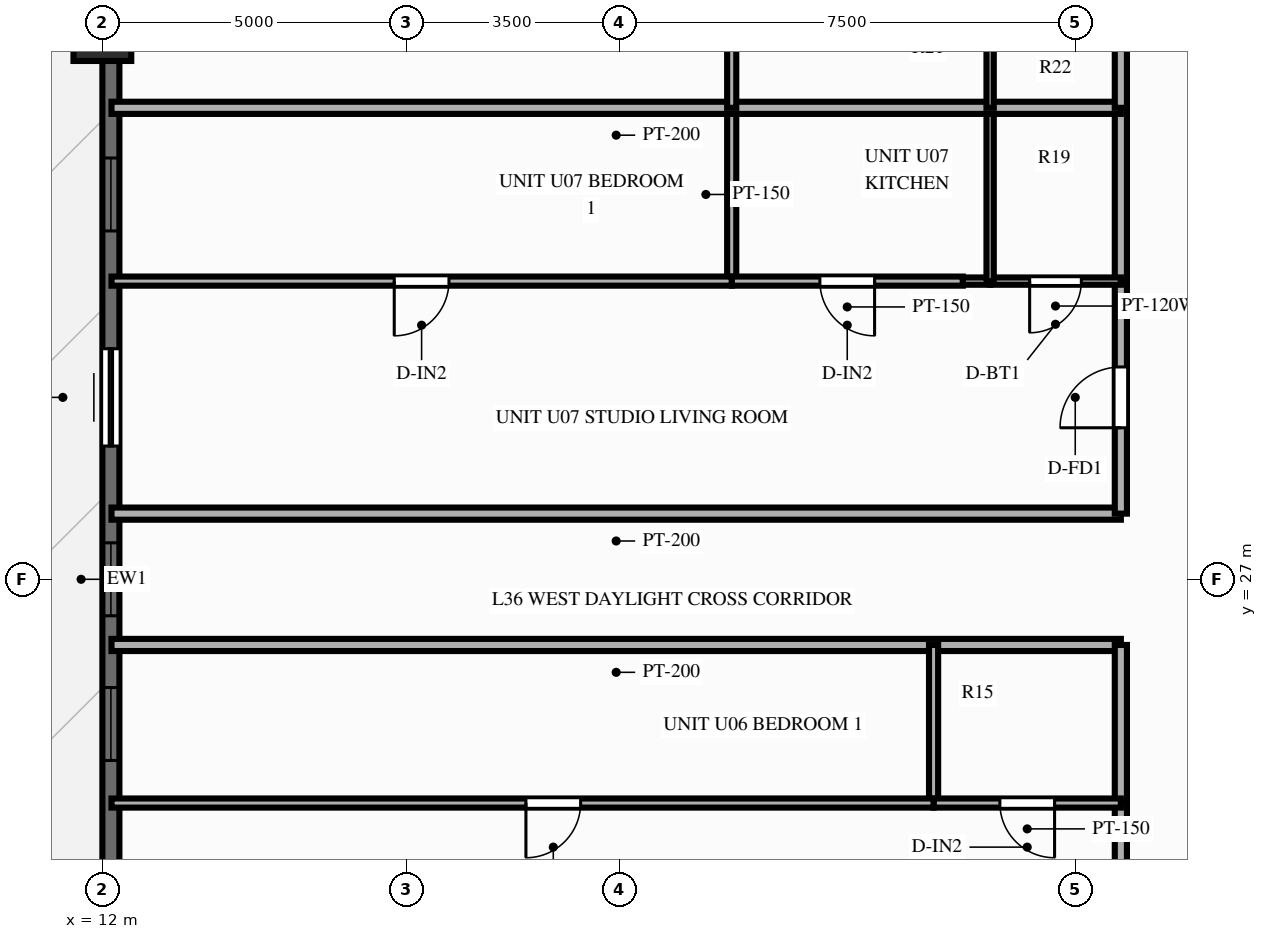
"""IFC4 building model, lengths in metres.
Left out: names, types, materials, properties, quantities, classifications, styles, units other than length and angle.
Written with IfcOpenShell. Run it as: python <this file> out.ifc"""

import sys

from ifc_helpers import new_model, si_unit, direction, frame, frame_2d, origin, origin_2d, place, context, subcontext, project, spatial, rectangle, extrude, source, transform, mapped, element, fill, save


model = new_model("IFC4")
c1 = context("Model", 3, precision=1e-05, world=origin(), true_north=direction((0.0, 1.0)))
c2 = subcontext(c1, "Body", "Model", "MODEL_VIEW")
j1 = project(units=[si_unit("LENGTHUNIT", "METRE"), si_unit("PLANEANGLEUNIT", "RADIAN")], contexts=[c1])
p1 = place(None, origin())
s1 = spatial("IfcSite", under=j1, at=p1, CompositionType="ELEMENT")
p2 = place(p1, origin())
s2 = spatial("IfcBuilding", under=s1, at=p2, CompositionType="ELEMENT")
p3 = place(p2, frame((0.0, 0.0, 113.85)))
s3 = spatial("IfcBuildingStorey", under=s2, at=p3, CompositionType="ELEMENT", Elevation=113.85)
m1 = source(origin(), c2, "Body", "SweptSolid", [
    extrude(rectangle(XDim=0.95, YDim=0.95, at=origin_2d()), origin(), (0.0, 0.0, 1.0), 3.0),
])
p4 = place(p3, frame((12.0, 36.0, 0.0), z_axis=(0.0, 0.0, 1.0), x_axis=(1.0, 0.0, 0.0)))
e1 = element("IfcColumn", 1, at=p4, inside=s3, PredefinedType="COLUMN", context=c2, shape_type="MappedRepresentation", body=[
    mapped(m1, transform((0.0, 0.0, 0.0), scale=1.0)),
])
p5 = place(p3, frame((12.14, 7.2, 0.0), z_axis=(0.0, 0.0, 1.0), x_axis=(0.0, 1.0, 0.0)))
e2 = element("IfcWall", 2, at=p5, inside=s3, PredefinedType="SOLIDWALL", context=c2, shape_type="SweptSolid", body=[
    extrude(rectangle(XDim=39.6, YDim=0.28, at=frame_2d((19.8, 0.0))), origin(), (0.0, 0.0, 1.0), 2.28),
])
p6 = place(p5, frame((0.945, 0.0, 0.25)))
e3 = element("IfcOpeningElement", 3, at=p6, cuts=e2, PredefinedType="OPENING", context=c2, shape_type="SweptSolid", body=[
    extrude(rectangle(XDim=1.2, YDim=1.5, at=frame_2d((0.6, 0.75))), frame((0.0, 0.152, 0.0), z_axis=(0.0, -1.0, 0.0), x_axis=(1.0, 0.0, 0.0)), (0.0, 0.0, 1.0), 0.304),
])
p7 = place(p5, frame((4.213, 0.0, 0.25)))
e4 = element("IfcOpeningElement", 4, at=p7, cuts=e2, PredefinedType="OPENING", context=c2, shape_type="SweptSolid", body=[
    extrude(rectangle(XDim=1.2, YDim=1.5, at=frame_2d((0.6, 0.75))), frame((0.0, 0.152, 0.0), z_axis=(0.0, -1.0, 0.0), x_axis=(1.0, 0.0, 0.0)), (0.0, 0.0, 1.0), 0.304),
])
p8 = place(p5, frame((7.55, 0.0, 0.25)))
e5 = element("IfcOpeningElement", 5, at=p8, cuts=e2, PredefinedType="OPENING", context=c2, shape_type="SweptSolid", body=[
    extrude(rectangle(XDim=1.2, YDim=1.5, at=frame_2d((0.6, 0.75))), frame((0.0, 0.152, 0.0), z_axis=(0.0, -1.0, 0.0), x_axis=(1.0, 0.0, 0.0)), (0.0, 0.0, 1.0), 0.304),
])
p9 = place(p5, frame((13.483, 0.0, 0.25)))
e6 = element("IfcOpeningElement", 6, at=p9, cuts=e2, PredefinedType="OPENING", context=c2, shape_type="SweptSolid", body=[
    extrude(rectangle(XDim=1.2, YDim=1.5, at=frame_2d((0.6, 0.75))), frame((0.0, 0.152, 0.0), z_axis=(0.0, -1.0, 0.0), x_axis=(1.0, 0.0, 0.0)), (0.0, 0.0, 1.0), 0.304),
])
p10 = place(p5, frame((16.82, 0.0, 0.25)))
e7 = element("IfcOpeningElement", 7, at=p10, cuts=e2, PredefinedType="OPENING", context=c2, shape_type="SweptSolid", body=[
    extrude(rectangle(XDim=1.2, YDim=1.5, at=frame_2d((0.6, 0.75))), frame((0.0, 0.152, 0.0), z_axis=(0.0, -1.0, 0.0), x_axis=(1.0, 0.0, 0.0)), (0.0, 0.0, 1.0), 0.304),
])
p11 = place(p5, frame((19.2, 0.0, 0.25)))
e8 = element("IfcOpeningElement", 8, at=p11, cuts=e2, PredefinedType="OPENING", context=c2, shape_type="SweptSolid", body=[
    extrude(rectangle(XDim=1.2, YDim=1.5, at=frame_2d((0.6, 0.75))), frame((0.0, 0.152, 0.0), z_axis=(0.0, -1.0, 0.0), x_axis=(1.0, 0.0, 0.0)), (0.0, 0.0, 1.0), 0.304),
])
p12 = place(p5, frame((21.992, 0.0, 0.0)))
e9 = element("IfcOpeningElement", 9, at=p12, cuts=e2, PredefinedType="OPENING", context=c2, shape_type="SweptSolid", body=[
    extrude(rectangle(XDim=1.6, YDim=2.15, at=frame_2d((0.8, 1.075))), frame((0.0, 0.152, 0.0), z_axis=(0.0, -1.0, 0.0), x_axis=(1.0, 0.0, 0.0)), (0.0, 0.0, 1.0), 0.304),
])
p13 = place(p5, frame((25.529, 0.0, 0.25)))
e10 = element("IfcOpeningElement", 10, at=p13, cuts=e2, PredefinedType="OPENING", context=c2, shape_type="SweptSolid", body=[
    extrude(rectangle(XDim=1.2, YDim=1.5, at=frame_2d((0.6, 0.75))), frame((0.0, 0.152, 0.0), z_axis=(0.0, -1.0, 0.0), x_axis=(1.0, 0.0, 0.0)), (0.0, 0.0, 1.0), 0.304),
])
p14 = place(p5, frame((29.349, 0.0, 0.25)))
e11 = element("IfcOpeningElement", 11, at=p14, cuts=e2, PredefinedType="OPENING", context=c2, shape_type="SweptSolid", body=[
    extrude(rectangle(XDim=0.7, YDim=1.5, at=frame_2d((0.35, 0.75))), frame((0.0, 0.152, 0.0), z_axis=(0.0, -1.0, 0.0), x_axis=(1.0, 0.0, 0.0)), (0.0, 0.0, 1.0), 0.304),
])
p15 = place(p5, frame((31.285, 0.0, 0.25)))
e12 = element("IfcOpeningElement", 12, at=p15, cuts=e2, PredefinedType="OPENING", context=c2, shape_type="SweptSolid", body=[
    extrude(rectangle(XDim=1.2, YDim=1.5, at=frame_2d((0.6, 0.75))), frame((0.0, 0.152, 0.0), z_axis=(0.0, -1.0, 0.0), x_axis=(1.0, 0.0, 0.0)), (0.0, 0.0, 1.0), 0.304),
])
p16 = place(p5, frame((34.252, 0.0, 0.25)))
e13 = element("IfcOpeningElement", 13, at=p16, cuts=e2, PredefinedType="OPENING", context=c2, shape_type="SweptSolid", body=[
    extrude(rectangle(XDim=1.2, YDim=1.5, at=frame_2d((0.6, 0.75))), frame((0.0, 0.152, 0.0), z_axis=(0.0, -1.0, 0.0), x_axis=(1.0, 0.0, 0.0)), (0.0, 0.0, 1.0), 0.304),
])
p17 = place(p5, frame((37.151, 0.0, 0.25)))
e14 = element("IfcOpeningElement", 14, at=p17, cuts=e2, PredefinedType="OPENING", context=c2, shape_type="SweptSolid", body=[
    extrude(rectangle(XDim=1.2, YDim=1.5, at=frame_2d((0.6, 0.75))), frame((0.0, 0.152, 0.0), z_axis=(0.0, -1.0, 0.0), x_axis=(1.0, 0.0, 0.0)), (0.0, 0.0, 1.0), 0.304),
])
p18 = place(p3, frame((28.75, 25.92, 0.0), z_axis=(0.0, 0.0, 1.0), x_axis=(-1.0, 0.0, 0.0)))
e15 = element("IfcWall", 15, at=p18, inside=s3, PredefinedType="PARTITIONING", context=c2, shape_type="SweptSolid", body=[
    extrude(rectangle(XDim=16.6, YDim=0.2, at=frame_2d((8.3, 0.0))), origin(), (0.0, 0.0, 1.0), 2.79),
])
p19 = place(p3, frame((28.75, 19.246, 0.0), z_axis=(0.0, 0.0, 1.0), x_axis=(0.0, 1.0, 0.0)))
e16 = element("IfcWall", 16, at=p19, inside=s3, PredefinedType="PARTITIONING", context=c2, shape_type="SweptSolid", body=[
    extrude(rectangle(XDim=4.074, YDim=0.2, at=frame_2d((2.037, 0.0))), origin(), (0.0, 0.0, 1.0), 2.79),
])
p20 = place(p19, frame((1.537, 0.0, 0.0)))
e17 = element("IfcOpeningElement", 17, at=p20, cuts=e16, PredefinedType="OPENING", context=c2, shape_type="SweptSolid", body=[
    extrude(rectangle(XDim=1.0, YDim=2.15, at=frame_2d((0.5, 1.075))), frame((0.0, 0.112, 0.0), z_axis=(0.0, -1.0, 0.0), x_axis=(1.0, 0.0, 0.0)), (0.0, 0.0, 1.0), 0.224),
])
p21 = place(p3, frame((28.75, 23.32, 0.0), z_axis=(0.0, 0.0, 1.0), x_axis=(0.0, 1.0, 0.0)))
e18 = element("IfcWall", 18, at=p21, inside=s3, PredefinedType="PARTITIONING", context=c2, shape_type="SweptSolid", body=[
    extrude(rectangle(XDim=2.6, YDim=0.2, at=frame_2d((1.3, 0.0))), origin(), (0.0, 0.0, 1.0), 2.79),
])
p22 = place(p3, frame((25.67, 23.32, 0.0), z_axis=(0.0, 0.0, 1.0), x_axis=(0.0, 1.0, 0.0)))
e19 = element("IfcWall", 19, at=p22, inside=s3, PredefinedType="PARTITIONING", context=c2, shape_type="SweptSolid", body=[
    extrude(rectangle(XDim=2.6, YDim=0.15, at=frame_2d((1.3, 0.0))), origin(), (0.0, 0.0, 1.0), 2.79),
])
p23 = place(p3, frame((28.75, 23.32, 0.0), z_axis=(0.0, 0.0, 1.0), x_axis=(-1.0, 0.0, 0.0)))
e20 = element("IfcWall", 20, at=p23, inside=s3, PredefinedType="PARTITIONING", context=c2, shape_type="SweptSolid", body=[
    extrude(rectangle(XDim=3.08, YDim=0.15, at=frame_2d((1.54, 0.0))), origin(), (0.0, 0.0, 1.0), 2.79),
])
p24 = place(p23, frame((1.09, 0.0, 0.0)))
e21 = element("IfcOpeningElement", 21, at=p24, cuts=e20, PredefinedType="OPENING", context=c2, shape_type="SweptSolid", body=[
    extrude(rectangle(XDim=0.9, YDim=2.1, at=frame_2d((0.45, 1.05))), frame((0.0, 0.087, 0.0), z_axis=(0.0, -1.0, 0.0), x_axis=(1.0, 0.0, 0.0)), (0.0, 0.0, 1.0), 0.174),
])
p25 = place(p3, frame((25.67, 23.32, 0.0), z_axis=(0.0, 0.0, 1.0), x_axis=(-1.0, 0.0, 0.0)))
e22 = element("IfcWall", 22, at=p25, inside=s3, PredefinedType="PARTITIONING", context=c2, shape_type="SweptSolid", body=[
    extrude(rectangle(XDim=13.52, YDim=0.15, at=frame_2d((6.76, 0.0))), origin(), (0.0, 0.0, 1.0), 2.79),
])
p26 = place(p25, frame((5.804, 0.0, 0.0)))
e23 = element("IfcOpeningElement", 23, at=p26, cuts=e22, PredefinedType="OPENING", context=c2, shape_type="SweptSolid", body=[
    extrude(rectangle(XDim=0.9, YDim=2.1, at=frame_2d((0.45, 1.05))), frame((0.0, 0.087, 0.0), z_axis=(0.0, -1.0, 0.0), x_axis=(1.0, 0.0, 0.0)), (0.0, 0.0, 1.0), 0.174),
])
p27 = place(p3, frame((28.75, 28.08, 0.0), z_axis=(0.0, 0.0, 1.0), x_axis=(-1.0, 0.0, 0.0)))
e24 = element("IfcWall", 24, at=p27, inside=s3, PredefinedType="PARTITIONING", context=c2, shape_type="SweptSolid", body=[
    extrude(rectangle(XDim=16.6, YDim=0.2, at=frame_2d((8.3, 0.0))), origin(), (0.0, 0.0, 1.0), 2.79),
])
p28 = place(p3, frame((28.75, 28.08, 0.0), z_axis=(0.0, 0.0, 1.0), x_axis=(0.0, 1.0, 0.0)))
e25 = element("IfcWall", 25, at=p28, inside=s3, PredefinedType="PARTITIONING", context=c2, shape_type="SweptSolid", body=[
    extrude(rectangle(XDim=3.824, YDim=0.2, at=frame_2d((1.912, 0.0))), origin(), (0.0, 0.0, 1.0), 2.79),
])
p29 = place(p28, frame((1.412, 0.0, 0.0)))
e26 = element("IfcOpeningElement", 26, at=p29, cuts=e25, PredefinedType="OPENING", context=c2, shape_type="SweptSolid", body=[
    extrude(rectangle(XDim=1.0, YDim=2.15, at=frame_2d((0.5, 1.075))), frame((0.0, 0.112, 0.0), z_axis=(0.0, -1.0, 0.0), x_axis=(1.0, 0.0, 0.0)), (0.0, 0.0, 1.0), 0.224),
])
p30 = place(p3, frame((28.75, 31.904, 0.0), z_axis=(0.0, 0.0, 1.0), x_axis=(0.0, 1.0, 0.0)))
e27 = element("IfcWall", 27, at=p30, inside=s3, PredefinedType="PARTITIONING", context=c2, shape_type="SweptSolid", body=[
    extrude(rectangle(XDim=2.85, YDim=0.2, at=frame_2d((1.425, 0.0))), origin(), (0.0, 0.0, 1.0), 2.79),
])
p31 = place(p3, frame((28.75, 31.904, 0.0), z_axis=(0.0, 0.0, 1.0), x_axis=(-1.0, 0.0, 0.0)))
e28 = element("IfcWall", 28, at=p31, inside=s3, PredefinedType="PARTITIONING", context=c2, shape_type="SweptSolid", body=[
    extrude(rectangle(XDim=2.15, YDim=0.12, at=frame_2d((1.075, 0.0))), origin(), (0.0, 0.0, 1.0), 2.79),
])
p32 = place(p31, frame((0.65, 0.0, 0.0)))
e29 = element("IfcOpeningElement", 29, at=p32, cuts=e28, PredefinedType="OPENING", context=c2, shape_type="SweptSolid", body=[
    extrude(rectangle(XDim=0.85, YDim=2.05, at=frame_2d((0.425, 1.025))), frame((0.0, 0.072, 0.0), z_axis=(0.0, -1.0, 0.0), x_axis=(1.0, 0.0, 0.0)), (0.0, 0.0, 1.0), 0.144),
])
p33 = place(p3, frame((26.6, 31.904, 0.0), z_axis=(0.0, 0.0, 1.0), x_axis=(-1.0, 0.0, 0.0)))
e30 = element("IfcWall", 30, at=p33, inside=s3, PredefinedType="PARTITIONING", context=c2, shape_type="SweptSolid", body=[
    extrude(rectangle(XDim=0.45, YDim=0.12, at=frame_2d((0.225, 0.0))), origin(), (0.0, 0.0, 1.0), 2.79),
])
p34 = place(p3, frame((26.6, 31.904, 0.0), z_axis=(0.0, 0.0, 1.0), x_axis=(0.0, 1.0, 0.0)))
e31 = element("IfcWall", 31, at=p34, inside=s3, PredefinedType="PARTITIONING", context=c2, shape_type="SweptSolid", body=[
    extrude(rectangle(XDim=2.85, YDim=0.12, at=frame_2d((1.425, 0.0))), origin(), (0.0, 0.0, 1.0), 2.79),
])
p35 = place(p3, frame((22.35, 31.904, 0.0), z_axis=(0.0, 0.0, 1.0), x_axis=(0.0, 1.0, 0.0)))
e32 = element("IfcWall", 32, at=p35, inside=s3, PredefinedType="PARTITIONING", context=c2, shape_type="SweptSolid", body=[
    extrude(rectangle(XDim=2.85, YDim=0.15, at=frame_2d((1.425, 0.0))), origin(), (0.0, 0.0, 1.0), 2.79),
])
p36 = place(p3, frame((26.15, 31.904, 0.0), z_axis=(0.0, 0.0, 1.0), x_axis=(-1.0, 0.0, 0.0)))
e33 = element("IfcWall", 33, at=p36, inside=s3, PredefinedType="PARTITIONING", context=c2, shape_type="SweptSolid", body=[
    extrude(rectangle(XDim=3.8, YDim=0.15, at=frame_2d((1.9, 0.0))), origin(), (0.0, 0.0, 1.0), 2.79),
])
p37 = place(p36, frame((1.45, 0.0, 0.0)))
e34 = element("IfcOpeningElement", 34, at=p37, cuts=e33, PredefinedType="OPENING", context=c2, shape_type="SweptSolid", body=[
    extrude(rectangle(XDim=0.9, YDim=2.1, at=frame_2d((0.45, 1.05))), frame((0.0, 0.087, 0.0), z_axis=(0.0, -1.0, 0.0), x_axis=(1.0, 0.0, 0.0)), (0.0, 0.0, 1.0), 0.174),
])
p38 = place(p3, frame((22.35, 31.904, 0.0), z_axis=(0.0, 0.0, 1.0), x_axis=(-1.0, 0.0, 0.0)))
e35 = element("IfcWall", 35, at=p38, inside=s3, PredefinedType="PARTITIONING", context=c2, shape_type="SweptSolid", body=[
    extrude(rectangle(XDim=10.2, YDim=0.15, at=frame_2d((5.1, 0.0))), origin(), (0.0, 0.0, 1.0), 2.79),
])
p39 = place(p38, frame((4.65, 0.0, 0.0)))
e36 = element("IfcOpeningElement", 36, at=p39, cuts=e35, PredefinedType="OPENING", context=c2, shape_type="SweptSolid", body=[
    extrude(rectangle(XDim=0.9, YDim=2.1, at=frame_2d((0.45, 1.05))), frame((0.0, 0.087, 0.0), z_axis=(0.0, -1.0, 0.0), x_axis=(1.0, 0.0, 0.0)), (0.0, 0.0, 1.0), 0.174),
])
p40 = place(p3, frame((28.75, 34.754, 0.0), z_axis=(0.0, 0.0, 1.0), x_axis=(-1.0, 0.0, 0.0)))
e37 = element("IfcWall", 37, at=p40, inside=s3, PredefinedType="PARTITIONING", context=c2, shape_type="SweptSolid", body=[
    extrude(rectangle(XDim=16.6, YDim=0.2, at=frame_2d((8.3, 0.0))), origin(), (0.0, 0.0, 1.0), 2.79),
])
p41 = place(p3, frame((28.75, 34.754, 0.0), z_axis=(0.0, 0.0, 1.0), x_axis=(0.0, 1.0, 0.0)))
e38 = element("IfcWall", 38, at=p41, inside=s3, PredefinedType="PARTITIONING", context=c2, shape_type="SweptSolid", body=[
    extrude(rectangle(XDim=2.729, YDim=0.2, at=frame_2d((1.365, 0.0))), origin(), (0.0, 0.0, 1.0), 2.79),
])
p42 = place(p3, frame((26.6, 34.754, 0.0), z_axis=(0.0, 0.0, 1.0), x_axis=(0.0, 1.0, 0.0)))
e39 = element("IfcWall", 39, at=p42, inside=s3, PredefinedType="PARTITIONING", context=c2, shape_type="SweptSolid", body=[
    extrude(rectangle(XDim=2.729, YDim=0.12, at=frame_2d((1.365, 0.0))), origin(), (0.0, 0.0, 1.0), 2.79),
])
p43 = place(p3, frame((22.35, 34.754, 0.0), z_axis=(0.0, 0.0, 1.0), x_axis=(0.0, 1.0, 0.0)))
e40 = element("IfcWall", 40, at=p43, inside=s3, PredefinedType="PARTITIONING", context=c2, shape_type="SweptSolid", body=[
    extrude(rectangle(XDim=2.729, YDim=0.15, at=frame_2d((1.365, 0.0))), origin(), (0.0, 0.0, 1.0), 2.79),
])
m2 = source(origin(), c2, "Body", "SweptSolid", [
    extrude(rectangle(XDim=1.2, YDim=1.5, at=frame_2d((0.6, 0.75))), frame((0.0, 0.03, 0.0), z_axis=(0.0, -1.0, 0.0), x_axis=(1.0, 0.0, 0.0)), (0.0, 0.0, 1.0), 0.06),
])
p44 = place(p10, origin())
e41 = element("IfcWindow", 41, at=p44, inside=s3, PartitioningType="SINGLE_PANEL", PredefinedType="WINDOW", context=c2, shape_type="MappedRepresentation", body=[
    mapped(m2, transform((0.0, 0.0, 0.0), scale=1.0)),
])
fill(e7, e41)
p45 = place(p11, origin())
e42 = element("IfcWindow", 42, at=p45, inside=s3, PartitioningType="SINGLE_PANEL", PredefinedType="WINDOW", context=c2, shape_type="MappedRepresentation", body=[
    mapped(m2, transform((0.0, 0.0, 0.0), scale=1.0)),
])
fill(e8, e42)
m3 = source(origin(), c2, "Body", "SweptSolid", [
    extrude(rectangle(XDim=1.6, YDim=2.15, at=frame_2d((0.8, 1.075))), frame((0.0, 0.025, 0.0), z_axis=(0.0, -1.0, 0.0), x_axis=(1.0, 0.0, 0.0)), (0.0, 0.0, 1.0), 0.05),
])
p46 = place(p12, origin())
e43 = element("IfcDoor", 43, at=p46, inside=s3, OperationType="SLIDING_TO_LEFT", PredefinedType="DOOR", context=c2, shape_type="MappedRepresentation", body=[
    mapped(m3, transform((0.0, 0.0, 0.0), scale=1.0)),
])
fill(e9, e43)
p47 = place(p13, origin())
e44 = element("IfcWindow", 44, at=p47, inside=s3, PartitioningType="SINGLE_PANEL", PredefinedType="WINDOW", context=c2, shape_type="MappedRepresentation", body=[
    mapped(m2, transform((0.0, 0.0, 0.0), scale=1.0)),
])
fill(e10, e44)
m4 = source(origin(), c2, "Body", "SweptSolid", [
    extrude(rectangle(XDim=0.9, YDim=2.1, at=frame_2d((0.45, 1.05))), frame((0.0, 0.025, 0.0), z_axis=(0.0, -1.0, 0.0), x_axis=(1.0, 0.0, 0.0)), (0.0, 0.0, 1.0), 0.05),
])
p48 = place(p24, origin())
e45 = element("IfcDoor", 45, at=p48, inside=s3, OperationType="SINGLE_SWING_LEFT", PredefinedType="DOOR", context=c2, shape_type="MappedRepresentation", body=[
    mapped(m4, transform((0.0, 0.0, 0.0), scale=1.0)),
])
fill(e21, e45)
p49 = place(p26, origin())
e46 = element("IfcDoor", 46, at=p49, inside=s3, OperationType="SINGLE_SWING_RIGHT", PredefinedType="DOOR", context=c2, shape_type="MappedRepresentation", body=[
    mapped(m4, transform((0.0, 0.0, 0.0), scale=1.0)),
])
fill(e23, e46)
m5 = source(origin(), c2, "Body", "SweptSolid", [
    extrude(rectangle(XDim=1.0, YDim=2.15, at=frame_2d((0.5, 1.075))), frame((0.0, 0.025, 0.0), z_axis=(0.0, -1.0, 0.0), x_axis=(1.0, 0.0, 0.0)), (0.0, 0.0, 1.0), 0.05),
])
p50 = place(p29, origin())
e47 = element("IfcDoor", 47, at=p50, inside=s3, OperationType="SINGLE_SWING_LEFT", PredefinedType="DOOR", context=c2, shape_type="MappedRepresentation", body=[
    mapped(m5, transform((0.0, 0.0, 0.0), scale=1.0)),
])
fill(e26, e47)
m6 = source(origin(), c2, "Body", "SweptSolid", [
    extrude(rectangle(XDim=0.85, YDim=2.05, at=frame_2d((0.425, 1.025))), frame((0.0, 0.025, 0.0), z_axis=(0.0, -1.0, 0.0), x_axis=(1.0, 0.0, 0.0)), (0.0, 0.0, 1.0), 0.05),
])
p51 = place(p32, origin())
e48 = element("IfcDoor", 48, at=p51, inside=s3, OperationType="SINGLE_SWING_RIGHT", PredefinedType="DOOR", context=c2, shape_type="MappedRepresentation", body=[
    mapped(m6, transform((0.0, 0.0, 0.0), scale=1.0)),
])
fill(e29, e48)
p52 = place(p37, origin())
e49 = element("IfcDoor", 49, at=p52, inside=s3, OperationType="SINGLE_SWING_LEFT", PredefinedType="DOOR", context=c2, shape_type="MappedRepresentation", body=[
    mapped(m4, transform((0.0, 0.0, 0.0), scale=1.0)),
])
fill(e34, e49)
p53 = place(p39, origin())
e50 = element("IfcDoor", 50, at=p53, inside=s3, OperationType="SINGLE_SWING_RIGHT", PredefinedType="DOOR", context=c2, shape_type="MappedRepresentation", body=[
    mapped(m4, transform((0.0, 0.0, 0.0), scale=1.0)),
])
fill(e36, e50)
save(model, sys.argv[1])
